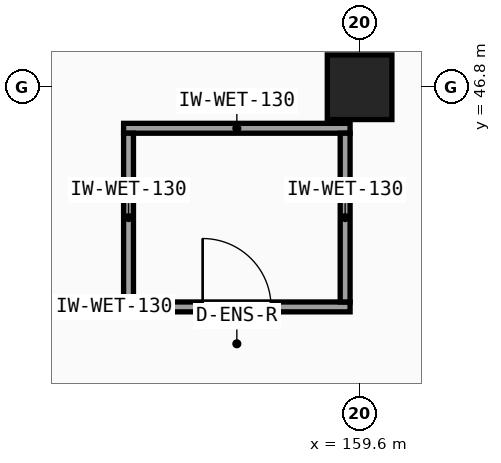
"""IFC4 building model, lengths in metres.
Left out: names, types, materials, properties, quantities, classifications, styles, units other than length and angle.
Written with IfcOpenShell. Run it as: python <this file> out.ifc"""

import sys

from ifc_helpers import new_model, si_unit, direction, frame, frame_2d, origin, origin_2d, place, context, subcontext, project, spatial, rectangle, extrude, element, fill, save


model = new_model("IFC4")
c1 = context("Model", 3, precision=1e-05, world=origin(), true_north=direction((0.0, 1.0)))
c2 = subcontext(c1, "Body", "Model", "MODEL_VIEW")
j1 = project(units=[si_unit("LENGTHUNIT", "METRE"), si_unit("PLANEANGLEUNIT", "RADIAN")], contexts=[c1])
p1 = place(None, origin())
s1 = spatial("IfcSite", under=j1, at=p1, CompositionType="ELEMENT")
p2 = place(p1, origin())
s2 = spatial("IfcBuilding", under=s1, at=p2, CompositionType="ELEMENT")
p3 = place(p2, origin())
s3 = spatial("IfcBuildingStorey", under=s2, at=p3, CompositionType="ELEMENT", Elevation=0.0)
p4 = place(p3, frame((159.6, 46.8, 0.0), z_axis=(0.0, 0.0, 1.0), x_axis=(1.0, 0.0, 0.0)))
e1 = element("IfcColumn", 1, at=p4, inside=s3, PredefinedType="COLUMN", context=c2, shape_type="SweptSolid", body=[
    extrude(rectangle(XDim=0.85, YDim=0.85, at=origin_2d()), origin(), (0.0, 0.0, 1.0), 5.1),
])
p5 = place(p3, frame((156.495, 43.91, 0.0), z_axis=(0.0, 0.0, 1.0), x_axis=(1.0, 0.0, 0.0)))
e2 = element("IfcWall", 2, at=p5, inside=s3, PredefinedType="PARTITIONING", context=c2, shape_type="SweptSolid", body=[
    extrude(rectangle(XDim=2.98, YDim=0.13, at=frame_2d((1.49, 0.0))), origin(), (0.0, 0.0, 1.0), 4.38),
])
p6 = place(p5, frame((1.04, 0.0, 0.0)))
e3 = element("IfcOpeningElement", 3, at=p6, cuts=e2, PredefinedType="OPENING", context=c2, shape_type="SweptSolid", body=[
    extrude(rectangle(XDim=0.9, YDim=2.1, at=frame_2d((0.45, 1.05))), frame((0.0, 0.075, 0.0), z_axis=(0.0, -1.0, 0.0), x_axis=(1.0, 0.0, 0.0)), (0.0, 0.0, 1.0), 0.15),
])
p7 = place(p3, frame((156.495, 46.26, 0.0), z_axis=(0.0, 0.0, 1.0), x_axis=(1.0, 0.0, 0.0)))
e4 = element("IfcWall", 4, at=p7, inside=s3, PredefinedType="PARTITIONING", context=c2, shape_type="SweptSolid", body=[
    extrude(rectangle(XDim=2.98, YDim=0.13, at=frame_2d((1.49, 0.0))), origin(), (0.0, 0.0, 1.0), 4.38),
])
p8 = place(p3, frame((156.56, 43.975, 0.0), z_axis=(0.0, 0.0, 1.0), x_axis=(0.0, 1.0, 0.0)))
e5 = element("IfcWall", 5, at=p8, inside=s3, PredefinedType="PARTITIONING", context=c2, shape_type="SweptSolid", body=[
    extrude(rectangle(XDim=2.22, YDim=0.13, at=frame_2d((1.11, 0.0))), origin(), (0.0, 0.0, 1.0), 4.82),
])
p9 = place(p3, frame((159.41, 43.975, 0.0), z_axis=(0.0, 0.0, 1.0), x_axis=(0.0, 1.0, 0.0)))
e6 = element("IfcWall", 6, at=p9, inside=s3, PredefinedType="PARTITIONING", context=c2, shape_type="SweptSolid", body=[
    extrude(rectangle(XDim=2.22, YDim=0.13, at=frame_2d((1.11, 0.0))), origin(), (0.0, 0.0, 1.0), 4.38),
])
p10 = place(p6, origin())
e7 = element("IfcDoor", 7, at=p10, inside=s3, OperationType="SINGLE_SWING_LEFT", PredefinedType="DOOR", context=c2, shape_type="SweptSolid", body=[
    extrude(rectangle(XDim=0.9, YDim=2.1, at=frame_2d((0.45, 1.05))), frame((0.0, 0.025, 0.0), z_axis=(0.0, -1.0, 0.0), x_axis=(1.0, 0.0, 0.0)), (0.0, 0.0, 1.0), 0.05),
])
fill(e3, e7)
save(model, sys.argv[1])
